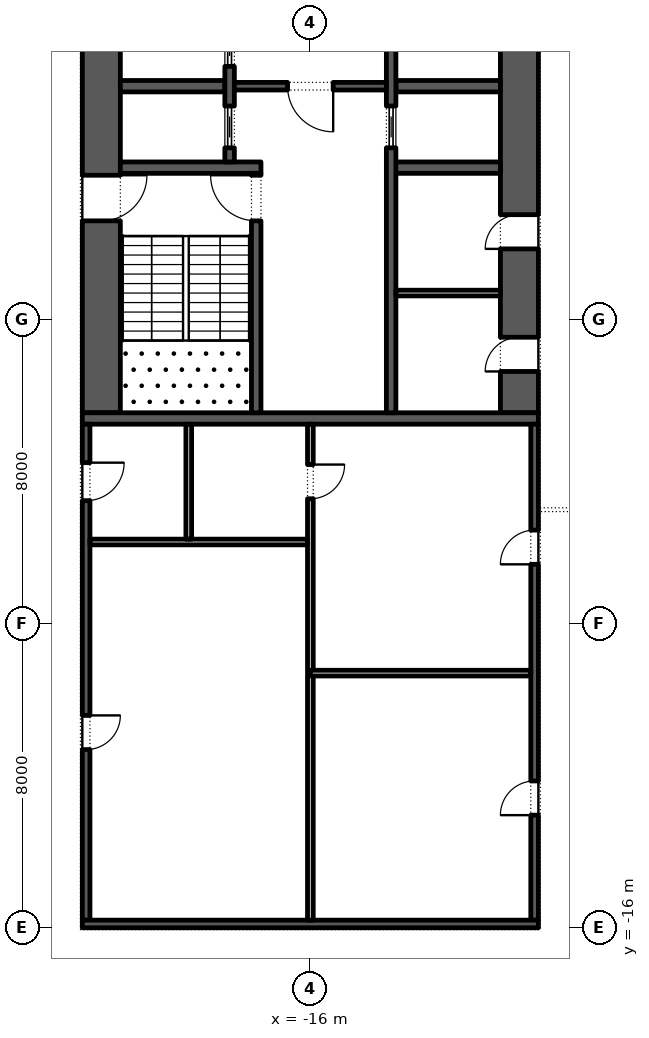
"""IFC4 building model, lengths in metres.
Left out: names, types, materials, properties, quantities, classifications, styles, units other than length and angle.
Written with IfcOpenShell. Run it as: python <this file> out.ifc"""

import sys

from ifc_helpers import new_model, si_unit, direction, frame, frame_2d, origin, place, context, subcontext, project, spatial, rectangle, extrude, element, fill, save


model = new_model("IFC4")
c1 = context("Model", 3, precision=1e-05, world=origin(), true_north=direction((0.0, 1.0)))
c2 = subcontext(c1, "Body", "Model", "MODEL_VIEW")
j1 = project(units=[si_unit("LENGTHUNIT", "METRE"), si_unit("PLANEANGLEUNIT", "RADIAN")], contexts=[c1])
p1 = place(None, origin())
s1 = spatial("IfcSite", under=j1, at=p1, CompositionType="ELEMENT")
p2 = place(p1, origin())
s2 = spatial("IfcBuilding", under=s1, at=p2, CompositionType="ELEMENT")
p3 = place(p2, frame((0.0, 0.0, 73.2)))
s3 = spatial("IfcBuildingStorey", under=s2, at=p3, CompositionType="ELEMENT", Elevation=73.2)
p4 = place(p3, frame((-21.5, -2.45, 0.0), z_axis=(0.0, 0.0, 1.0), x_axis=(0.0, 1.0, 0.0)))
e1 = element("IfcWall", 1, at=p4, inside=s3, PredefinedType="SHEAR", context=c2, shape_type="SweptSolid", body=[
    extrude(rectangle(XDim=27.9, YDim=1.0, at=frame_2d((13.95, 0.0))), origin(), (0.0, 0.0, 1.0), 4.0),
])
p5 = place(p4, frame((5.05, 0.0, 0.0)))
e2 = element("IfcOpeningElement", 2, at=p5, cuts=e1, PredefinedType="OPENING", context=c2, shape_type="SweptSolid", body=[
    extrude(rectangle(XDim=1.2, YDim=2.1, at=frame_2d((0.6, 1.05))), frame((0.0, 0.51, 0.0), z_axis=(0.0, -1.0, 0.0), x_axis=(1.0, 0.0, 0.0)), (0.0, 0.0, 1.0), 1.02),
])
p6 = place(p4, frame((21.65, 0.0, 0.0)))
e3 = element("IfcOpeningElement", 3, at=p6, cuts=e1, PredefinedType="OPENING", context=c2, shape_type="SweptSolid", body=[
    extrude(rectangle(XDim=1.2, YDim=2.1, at=frame_2d((0.6, 1.05))), frame((0.0, 0.51, 0.0), z_axis=(0.0, -1.0, 0.0), x_axis=(1.0, 0.0, 0.0)), (0.0, 0.0, 1.0), 1.02),
])
p7 = place(p3, frame((-10.5, -2.45, 0.0), z_axis=(0.0, 0.0, 1.0), x_axis=(0.0, 1.0, 0.0)))
e4 = element("IfcWall", 4, at=p7, inside=s3, PredefinedType="SHEAR", context=c2, shape_type="SweptSolid", body=[
    extrude(rectangle(XDim=27.9, YDim=1.0, at=frame_2d((13.95, 0.0))), origin(), (0.0, 0.0, 1.0), 4.0),
])
p8 = place(p7, frame((23.65, 0.0, 0.0)))
e5 = element("IfcOpeningElement", 5, at=p8, cuts=e4, PredefinedType="OPENING", context=c2, shape_type="SweptSolid", body=[
    extrude(rectangle(XDim=2.4, YDim=2.1, at=frame_2d((1.2, 1.05))), frame((0.0, 0.51, 0.0), z_axis=(0.0, -1.0, 0.0), x_axis=(1.0, 0.0, 0.0)), (0.0, 0.0, 1.0), 1.02),
])
p9 = place(p7, frame((1.087, 0.0, 0.0)))
e6 = element("IfcOpeningElement", 6, at=p9, cuts=e4, PredefinedType="OPENING", context=c2, shape_type="SweptSolid", body=[
    extrude(rectangle(XDim=0.9, YDim=2.1, at=frame_2d((0.45, 1.05))), frame((0.0, 0.51, 0.0), z_axis=(0.0, -1.0, 0.0), x_axis=(1.0, 0.0, 0.0)), (0.0, 0.0, 1.0), 1.02),
])
p10 = place(p7, frame((4.312, 0.0, 0.0)))
e7 = element("IfcOpeningElement", 7, at=p10, cuts=e4, PredefinedType="OPENING", context=c2, shape_type="SweptSolid", body=[
    extrude(rectangle(XDim=0.9, YDim=2.1, at=frame_2d((0.45, 1.05))), frame((0.0, 0.51, 0.0), z_axis=(0.0, -1.0, 0.0), x_axis=(1.0, 0.0, 0.0)), (0.0, 0.0, 1.0), 1.02),
])
p11 = place(p3, frame((-22.0, -2.6, 0.0), z_axis=(0.0, 0.0, 1.0), x_axis=(1.0, 0.0, 0.0)))
e8 = element("IfcWall", 8, at=p11, inside=s3, PredefinedType="SHEAR", context=c2, shape_type="SweptSolid", body=[
    extrude(rectangle(XDim=12.0, YDim=0.3, at=frame_2d((6.0, 0.0))), origin(), (0.0, 0.0, 1.0), 4.0),
])
p12 = place(p3, frame((-21.0, 4.0, 0.0), z_axis=(0.0, 0.0, 1.0), x_axis=(1.0, 0.0, 0.0)))
e9 = element("IfcWall", 9, at=p12, inside=s3, PredefinedType="SHEAR", context=c2, shape_type="SweptSolid", body=[
    extrude(rectangle(XDim=3.7, YDim=0.3, at=frame_2d((1.85, 0.0))), origin(), (0.0, 0.0, 1.0), 4.0),
])
p13 = place(p3, frame((-17.425, -2.45, 0.0), z_axis=(0.0, 0.0, 1.0), x_axis=(0.0, 1.0, 0.0)))
e10 = element("IfcWall", 10, at=p13, inside=s3, PredefinedType="SHEAR", context=c2, shape_type="SweptSolid", body=[
    extrude(rectangle(XDim=6.3, YDim=0.25, at=frame_2d((3.15, 0.0))), origin(), (0.0, 0.0, 1.0), 4.0),
])
p14 = place(p13, frame((5.05, 0.0, 0.0)))
e11 = element("IfcOpeningElement", 11, at=p14, cuts=e10, PredefinedType="OPENING", context=c2, shape_type="SweptSolid", body=[
    extrude(rectangle(XDim=1.2, YDim=2.1, at=frame_2d((0.6, 1.05))), frame((0.0, 0.135, 0.0), z_axis=(0.0, -1.0, 0.0), x_axis=(1.0, 0.0, 0.0)), (0.0, 0.0, 1.0), 0.27),
])
p15 = place(p3, frame((-21.0, 6.143, 0.0), z_axis=(0.0, 0.0, 1.0), x_axis=(1.0, 0.0, 0.0)))
e12 = element("IfcWall", 12, at=p15, inside=s3, PredefinedType="SHEAR", context=c2, shape_type="SweptSolid", body=[
    extrude(rectangle(XDim=2.75, YDim=0.3, at=frame_2d((1.375, 0.0))), origin(), (0.0, 0.0, 1.0), 4.0),
])
p16 = place(p3, frame((-18.125, 4.15, 0.0), z_axis=(0.0, 0.0, 1.0), x_axis=(0.0, 1.0, 0.0)))
e13 = element("IfcWall", 13, at=p16, inside=s3, PredefinedType="SHEAR", context=c2, shape_type="SweptSolid", body=[
    extrude(rectangle(XDim=14.7, YDim=0.25, at=frame_2d((7.35, 0.0))), origin(), (0.0, 0.0, 1.0), 4.0),
])
p17 = place(p16, frame((0.371, 0.0, 0.0)))
e14 = element("IfcOpeningElement", 14, at=p17, cuts=e13, PredefinedType="OPENING", context=c2, shape_type="SweptSolid", body=[
    extrude(rectangle(XDim=1.1, YDim=2.1, at=frame_2d((0.55, 1.05))), frame((0.0, 0.135, 0.0), z_axis=(0.0, -1.0, 0.0), x_axis=(1.0, 0.0, 0.0)), (0.0, 0.0, 1.0), 0.27),
])
p18 = place(p16, frame((2.514, 0.0, 0.0)))
e15 = element("IfcOpeningElement", 15, at=p18, cuts=e13, PredefinedType="OPENING", context=c2, shape_type="SweptSolid", body=[
    extrude(rectangle(XDim=1.1, YDim=2.1, at=frame_2d((0.55, 1.05))), frame((0.0, 0.135, 0.0), z_axis=(0.0, -1.0, 0.0), x_axis=(1.0, 0.0, 0.0)), (0.0, 0.0, 1.0), 0.27),
])
p19 = place(p16, frame((4.657, 0.0, 0.0)))
e16 = element("IfcOpeningElement", 16, at=p19, cuts=e13, PredefinedType="OPENING", context=c2, shape_type="SweptSolid", body=[
    extrude(rectangle(XDim=1.1, YDim=2.1, at=frame_2d((0.55, 1.05))), frame((0.0, 0.135, 0.0), z_axis=(0.0, -1.0, 0.0), x_axis=(1.0, 0.0, 0.0)), (0.0, 0.0, 1.0), 0.27),
])
p20 = place(p16, frame((6.8, 0.0, 0.0)))
e17 = element("IfcOpeningElement", 17, at=p20, cuts=e13, PredefinedType="OPENING", context=c2, shape_type="SweptSolid", body=[
    extrude(rectangle(XDim=1.1, YDim=2.1, at=frame_2d((0.55, 1.05))), frame((0.0, 0.135, 0.0), z_axis=(0.0, -1.0, 0.0), x_axis=(1.0, 0.0, 0.0)), (0.0, 0.0, 1.0), 0.27),
])
p21 = place(p16, frame((8.943, 0.0, 0.0)))
e18 = element("IfcOpeningElement", 18, at=p21, cuts=e13, PredefinedType="OPENING", context=c2, shape_type="SweptSolid", body=[
    extrude(rectangle(XDim=1.1, YDim=2.1, at=frame_2d((0.55, 1.05))), frame((0.0, 0.135, 0.0), z_axis=(0.0, -1.0, 0.0), x_axis=(1.0, 0.0, 0.0)), (0.0, 0.0, 1.0), 0.27),
])
p22 = place(p16, frame((11.086, 0.0, 0.0)))
e19 = element("IfcOpeningElement", 19, at=p22, cuts=e13, PredefinedType="OPENING", context=c2, shape_type="SweptSolid", body=[
    extrude(rectangle(XDim=1.1, YDim=2.1, at=frame_2d((0.55, 1.05))), frame((0.0, 0.135, 0.0), z_axis=(0.0, -1.0, 0.0), x_axis=(1.0, 0.0, 0.0)), (0.0, 0.0, 1.0), 0.27),
])
p23 = place(p16, frame((13.229, 0.0, 0.0)))
e20 = element("IfcOpeningElement", 20, at=p23, cuts=e13, PredefinedType="OPENING", context=c2, shape_type="SweptSolid", body=[
    extrude(rectangle(XDim=1.1, YDim=2.1, at=frame_2d((0.55, 1.05))), frame((0.0, 0.135, 0.0), z_axis=(0.0, -1.0, 0.0), x_axis=(1.0, 0.0, 0.0)), (0.0, 0.0, 1.0), 0.27),
])
p24 = place(p3, frame((-14.0, 4.0, 0.0), z_axis=(0.0, 0.0, 1.0), x_axis=(1.0, 0.0, 0.0)))
e21 = element("IfcWall", 21, at=p24, inside=s3, PredefinedType="SHEAR", context=c2, shape_type="SweptSolid", body=[
    extrude(rectangle(XDim=3.0, YDim=0.3, at=frame_2d((1.5, 0.0))), origin(), (0.0, 0.0, 1.0), 4.0),
])
p25 = place(p3, frame((-13.75, 6.143, 0.0), z_axis=(0.0, 0.0, 1.0), x_axis=(1.0, 0.0, 0.0)))
e22 = element("IfcWall", 22, at=p25, inside=s3, PredefinedType="SHEAR", context=c2, shape_type="SweptSolid", body=[
    extrude(rectangle(XDim=2.75, YDim=0.3, at=frame_2d((1.375, 0.0))), origin(), (0.0, 0.0, 1.0), 4.0),
])
p26 = place(p3, frame((-13.875, -2.45, 0.0), z_axis=(0.0, 0.0, 1.0), x_axis=(0.0, 1.0, 0.0)))
e23 = element("IfcWall", 23, at=p26, inside=s3, PredefinedType="SHEAR", context=c2, shape_type="SweptSolid", body=[
    extrude(rectangle(XDim=21.3, YDim=0.25, at=frame_2d((10.65, 0.0))), origin(), (0.0, 0.0, 1.0), 4.0),
])
p27 = place(p26, frame((14.571, 0.0, 0.0)))
e24 = element("IfcOpeningElement", 24, at=p27, cuts=e23, PredefinedType="OPENING", context=c2, shape_type="SweptSolid", body=[
    extrude(rectangle(XDim=0.9, YDim=2.1, at=frame_2d((0.45, 1.05))), frame((0.0, 0.135, 0.0), z_axis=(0.0, -1.0, 0.0), x_axis=(1.0, 0.0, 0.0)), (0.0, 0.0, 1.0), 0.27),
])
p28 = place(p26, frame((6.971, 0.0, 0.0)))
e25 = element("IfcOpeningElement", 25, at=p28, cuts=e23, PredefinedType="OPENING", context=c2, shape_type="SweptSolid", body=[
    extrude(rectangle(XDim=1.1, YDim=2.1, at=frame_2d((0.55, 1.05))), frame((0.0, 0.135, 0.0), z_axis=(0.0, -1.0, 0.0), x_axis=(1.0, 0.0, 0.0)), (0.0, 0.0, 1.0), 0.27),
])
p29 = place(p3, frame((-18.0, 6.143, 0.0), z_axis=(0.0, 0.0, 1.0), x_axis=(1.0, 0.0, 0.0)))
e26 = element("IfcWall", 26, at=p29, inside=s3, PredefinedType="SHEAR", context=c2, shape_type="SweptSolid", body=[
    extrude(rectangle(XDim=4.0, YDim=0.2, at=frame_2d((2.0, 0.0))), origin(), (0.0, 0.0, 1.0), 4.0),
])
p30 = place(p29, frame((1.4, 0.0, 0.0)))
e27 = element("IfcOpeningElement", 27, at=p30, cuts=e26, PredefinedType="OPENING", context=c2, shape_type="SweptSolid", body=[
    extrude(rectangle(XDim=1.2, YDim=2.1, at=frame_2d((0.6, 1.05))), frame((0.0, 0.11, 0.0), z_axis=(0.0, -1.0, 0.0), x_axis=(1.0, 0.0, 0.0)), (0.0, 0.0, 1.0), 0.22),
])
p31 = place(p3, frame((-13.75, 0.7, 0.0), z_axis=(0.0, 0.0, 1.0), x_axis=(1.0, 0.0, 0.0)))
e28 = element("IfcWall", 28, at=p31, inside=s3, PredefinedType="PARTITIONING", context=c2, shape_type="SweptSolid", body=[
    extrude(rectangle(XDim=2.75, YDim=0.15, at=frame_2d((1.375, 0.0))), origin(), (0.0, 0.0, 1.0), 4.0),
])
p32 = place(p3, frame((-21.9, -15.8, 0.0), z_axis=(0.0, 0.0, 1.0), x_axis=(0.0, 1.0, 0.0)))
e29 = element("IfcWall", 29, at=p32, inside=s3, PredefinedType="SHEAR", context=c2, shape_type="SweptSolid", body=[
    extrude(rectangle(XDim=13.05, YDim=0.2, at=frame_2d((6.525, 0.0))), origin(), (0.0, 0.0, 1.0), 4.0),
])
p33 = place(p32, frame((4.488, 0.0, 0.0)))
e30 = element("IfcOpeningElement", 30, at=p33, cuts=e29, PredefinedType="OPENING", context=c2, shape_type="SweptSolid", body=[
    extrude(rectangle(XDim=0.9, YDim=2.1, at=frame_2d((0.45, 1.05))), frame((0.0, 0.11, 0.0), z_axis=(0.0, -1.0, 0.0), x_axis=(1.0, 0.0, 0.0)), (0.0, 0.0, 1.0), 0.22),
])
p34 = place(p32, frame((11.038, 0.0, 0.0)))
e31 = element("IfcOpeningElement", 31, at=p34, cuts=e29, PredefinedType="OPENING", context=c2, shape_type="SweptSolid", body=[
    extrude(rectangle(XDim=1.0, YDim=2.1, at=frame_2d((0.5, 1.05))), frame((0.0, 0.11, 0.0), z_axis=(0.0, -1.0, 0.0), x_axis=(1.0, 0.0, 0.0)), (0.0, 0.0, 1.0), 0.22),
])
p35 = place(p3, frame((-10.1, -15.8, 0.0), z_axis=(0.0, 0.0, 1.0), x_axis=(0.0, 1.0, 0.0)))
e32 = element("IfcWall", 32, at=p35, inside=s3, PredefinedType="SHEAR", context=c2, shape_type="SweptSolid", body=[
    extrude(rectangle(XDim=13.05, YDim=0.2, at=frame_2d((6.525, 0.0))), origin(), (0.0, 0.0, 1.0), 4.0),
])
p36 = place(p35, frame((2.762, 0.0, 0.0)))
e33 = element("IfcOpeningElement", 33, at=p36, cuts=e32, PredefinedType="OPENING", context=c2, shape_type="SweptSolid", body=[
    extrude(rectangle(XDim=0.9, YDim=2.1, at=frame_2d((0.45, 1.05))), frame((0.0, 0.11, 0.0), z_axis=(0.0, -1.0, 0.0), x_axis=(1.0, 0.0, 0.0)), (0.0, 0.0, 1.0), 0.22),
])
p37 = place(p35, frame((9.363, 0.0, 0.0)))
e34 = element("IfcOpeningElement", 34, at=p37, cuts=e32, PredefinedType="OPENING", context=c2, shape_type="SweptSolid", body=[
    extrude(rectangle(XDim=0.9, YDim=2.1, at=frame_2d((0.45, 1.05))), frame((0.0, 0.11, 0.0), z_axis=(0.0, -1.0, 0.0), x_axis=(1.0, 0.0, 0.0)), (0.0, 0.0, 1.0), 0.22),
])
p38 = place(p3, frame((-22.0, -15.9, 0.0), z_axis=(0.0, 0.0, 1.0), x_axis=(1.0, 0.0, 0.0)))
e35 = element("IfcWall", 35, at=p38, inside=s3, PredefinedType="SHEAR", context=c2, shape_type="SweptSolid", body=[
    extrude(rectangle(XDim=12.0, YDim=0.2, at=frame_2d((6.0, 0.0))), origin(), (0.0, 0.0, 1.0), 4.0),
])
p39 = place(p3, frame((-16.0, -15.8, 0.0), z_axis=(0.0, 0.0, 1.0), x_axis=(0.0, 1.0, 0.0)))
e36 = element("IfcWall", 36, at=p39, inside=s3, PredefinedType="PARTITIONING", context=c2, shape_type="SweptSolid", body=[
    extrude(rectangle(XDim=13.05, YDim=0.15, at=frame_2d((6.525, 0.0))), origin(), (0.0, 0.0, 1.0), 4.0),
])
p40 = place(p39, frame((11.087, 0.0, 0.0)))
e37 = element("IfcOpeningElement", 37, at=p40, cuts=e36, PredefinedType="OPENING", context=c2, shape_type="SweptSolid", body=[
    extrude(rectangle(XDim=0.9, YDim=2.1, at=frame_2d((0.45, 1.05))), frame((0.0, 0.085, 0.0), z_axis=(0.0, -1.0, 0.0), x_axis=(1.0, 0.0, 0.0)), (0.0, 0.0, 1.0), 0.17),
])
p41 = place(p3, frame((-16.0, -9.3, 0.0), z_axis=(0.0, 0.0, 1.0), x_axis=(1.0, 0.0, 0.0)))
e38 = element("IfcWall", 38, at=p41, inside=s3, PredefinedType="PARTITIONING", context=c2, shape_type="SweptSolid", body=[
    extrude(rectangle(XDim=5.8, YDim=0.15, at=frame_2d((2.9, 0.0))), origin(), (0.0, 0.0, 1.0), 4.0),
])
p42 = place(p3, frame((-21.8, -5.85, 0.0), z_axis=(0.0, 0.0, 1.0), x_axis=(1.0, 0.0, 0.0)))
e39 = element("IfcWall", 39, at=p42, inside=s3, PredefinedType="PARTITIONING", context=c2, shape_type="SweptSolid", body=[
    extrude(rectangle(XDim=5.725, YDim=0.15, at=frame_2d((2.863, 0.0))), origin(), (0.0, 0.0, 1.0), 4.0),
])
p43 = place(p3, frame((-19.2, -5.775, 0.0), z_axis=(0.0, 0.0, 1.0), x_axis=(0.0, 1.0, 0.0)))
e40 = element("IfcWall", 40, at=p43, inside=s3, PredefinedType="PARTITIONING", context=c2, shape_type="SweptSolid", body=[
    extrude(rectangle(XDim=3.025, YDim=0.15, at=frame_2d((1.512, 0.0))), origin(), (0.0, 0.0, 1.0), 4.0),
])
p44 = place(p17, origin())
e41 = element("IfcDoor", 41, at=p44, inside=s3, OperationType="SLIDING_TO_LEFT", PredefinedType="DOOR", context=c2, shape_type="SweptSolid", body=[
    extrude(rectangle(XDim=1.1, YDim=2.1, at=frame_2d((0.55, 1.05))), frame((0.0, 0.025, 0.0), z_axis=(0.0, -1.0, 0.0), x_axis=(1.0, 0.0, 0.0)), (0.0, 0.0, 1.0), 0.05),
])
fill(e14, e41)
p45 = place(p18, origin())
e42 = element("IfcDoor", 42, at=p45, inside=s3, OperationType="SLIDING_TO_LEFT", PredefinedType="DOOR", context=c2, shape_type="SweptSolid", body=[
    extrude(rectangle(XDim=1.1, YDim=2.1, at=frame_2d((0.55, 1.05))), frame((0.0, 0.025, 0.0), z_axis=(0.0, -1.0, 0.0), x_axis=(1.0, 0.0, 0.0)), (0.0, 0.0, 1.0), 0.05),
])
fill(e15, e42)
p46 = place(p28, origin())
e43 = element("IfcDoor", 43, at=p46, inside=s3, OperationType="SLIDING_TO_LEFT", PredefinedType="DOOR", context=c2, shape_type="SweptSolid", body=[
    extrude(rectangle(XDim=1.1, YDim=2.1, at=frame_2d((0.55, 1.05))), frame((0.0, 0.025, 0.0), z_axis=(0.0, -1.0, 0.0), x_axis=(1.0, 0.0, 0.0)), (0.0, 0.0, 1.0), 0.05),
])
fill(e25, e43)
p47 = place(p30, frame((1.2, 0.0, 0.0), z_axis=(0.0, 0.0, 1.0), x_axis=(-1.0, 0.0, 0.0)))
e44 = element("IfcDoor", 44, at=p47, inside=s3, OperationType="SINGLE_SWING_RIGHT", PredefinedType="DOOR", context=c2, shape_type="SweptSolid", body=[
    extrude(rectangle(XDim=1.2, YDim=2.1, at=frame_2d((0.6, 1.05))), frame((0.0, 0.025, 0.0), z_axis=(0.0, -1.0, 0.0), x_axis=(1.0, 0.0, 0.0)), (0.0, 0.0, 1.0), 0.05),
])
fill(e27, e44)
p48 = place(p14, origin())
e45 = element("IfcDoor", 45, at=p48, inside=s3, OperationType="SINGLE_SWING_LEFT", PredefinedType="DOOR", context=c2, shape_type="SweptSolid", body=[
    extrude(rectangle(XDim=1.2, YDim=2.1, at=frame_2d((0.6, 1.05))), frame((0.0, 0.025, 0.0), z_axis=(0.0, -1.0, 0.0), x_axis=(1.0, 0.0, 0.0)), (0.0, 0.0, 1.0), 0.05),
])
fill(e11, e45)
p49 = place(p5, frame((1.2, 0.0, 0.0), z_axis=(0.0, 0.0, 1.0), x_axis=(-1.0, 0.0, 0.0)))
e46 = element("IfcDoor", 46, at=p49, inside=s3, OperationType="SINGLE_SWING_RIGHT", PredefinedType="DOOR", context=c2, shape_type="SweptSolid", body=[
    extrude(rectangle(XDim=1.2, YDim=2.1, at=frame_2d((0.6, 1.05))), frame((0.0, 0.025, 0.0), z_axis=(0.0, -1.0, 0.0), x_axis=(1.0, 0.0, 0.0)), (0.0, 0.0, 1.0), 0.05),
])
fill(e2, e46)
p50 = place(p9, origin())
e47 = element("IfcDoor", 47, at=p50, inside=s3, OperationType="SINGLE_SWING_RIGHT", PredefinedType="DOOR", context=c2, shape_type="SweptSolid", body=[
    extrude(rectangle(XDim=0.9, YDim=2.1, at=frame_2d((0.45, 1.05))), frame((0.0, 0.5, 0.0), z_axis=(0.0, -1.0, 0.0), x_axis=(1.0, 0.0, 0.0)), (0.0, 0.0, 1.0), 0.05),
])
fill(e6, e47)
p51 = place(p10, origin())
e48 = element("IfcDoor", 48, at=p51, inside=s3, OperationType="SINGLE_SWING_RIGHT", PredefinedType="DOOR", context=c2, shape_type="SweptSolid", body=[
    extrude(rectangle(XDim=0.9, YDim=2.1, at=frame_2d((0.45, 1.05))), frame((0.0, 0.5, 0.0), z_axis=(0.0, -1.0, 0.0), x_axis=(1.0, 0.0, 0.0)), (0.0, 0.0, 1.0), 0.05),
])
fill(e7, e48)
p52 = place(p33, frame((0.9, -0.15, 0.0), z_axis=(0.0, 0.0, 1.0), x_axis=(-1.0, 0.0, 0.0)))
e49 = element("IfcDoor", 49, at=p52, inside=s3, OperationType="SINGLE_SWING_RIGHT", PredefinedType="DOOR", context=c2, shape_type="SweptSolid", body=[
    extrude(rectangle(XDim=0.9, YDim=2.1, at=frame_2d((0.45, 1.05))), frame((0.0, -0.05, 0.0), z_axis=(0.0, -1.0, 0.0), x_axis=(1.0, 0.0, 0.0)), (0.0, 0.0, 1.0), 0.05),
])
fill(e30, e49)
p53 = place(p34, frame((1.0, -0.15, 0.0), z_axis=(0.0, 0.0, 1.0), x_axis=(-1.0, 0.0, 0.0)))
e50 = element("IfcDoor", 50, at=p53, inside=s3, OperationType="SINGLE_SWING_RIGHT", PredefinedType="DOOR", context=c2, shape_type="SweptSolid", body=[
    extrude(rectangle(XDim=1.0, YDim=2.1, at=frame_2d((0.5, 1.05))), frame((0.0, -0.05, 0.0), z_axis=(0.0, -1.0, 0.0), x_axis=(1.0, 0.0, 0.0)), (0.0, 0.0, 1.0), 0.05),
])
fill(e31, e50)
p54 = place(p40, frame((0.9, 0.0, 0.0), z_axis=(0.0, 0.0, 1.0), x_axis=(-1.0, 0.0, 0.0)))
e51 = element("IfcDoor", 51, at=p54, inside=s3, OperationType="SINGLE_SWING_RIGHT", PredefinedType="DOOR", context=c2, shape_type="SweptSolid", body=[
    extrude(rectangle(XDim=0.9, YDim=2.1, at=frame_2d((0.45, 1.05))), frame((0.0, 0.025, 0.0), z_axis=(0.0, -1.0, 0.0), x_axis=(1.0, 0.0, 0.0)), (0.0, 0.0, 1.0), 0.05),
])
fill(e37, e51)
p55 = place(p36, origin())
e52 = element("IfcDoor", 52, at=p55, inside=s3, OperationType="SINGLE_SWING_RIGHT", PredefinedType="DOOR", context=c2, shape_type="SweptSolid", body=[
    extrude(rectangle(XDim=0.9, YDim=2.1, at=frame_2d((0.45, 1.05))), frame((0.0, 0.1, 0.0), z_axis=(0.0, -1.0, 0.0), x_axis=(1.0, 0.0, 0.0)), (0.0, 0.0, 1.0), 0.05),
])
fill(e33, e52)
p56 = place(p37, origin())
e53 = element("IfcDoor", 53, at=p56, inside=s3, OperationType="SINGLE_SWING_RIGHT", PredefinedType="DOOR", context=c2, shape_type="SweptSolid", body=[
    extrude(rectangle(XDim=0.9, YDim=2.1, at=frame_2d((0.45, 1.05))), frame((0.0, 0.1, 0.0), z_axis=(0.0, -1.0, 0.0), x_axis=(1.0, 0.0, 0.0)), (0.0, 0.0, 1.0), 0.05),
])
fill(e34, e53)
save(model, sys.argv[1])
